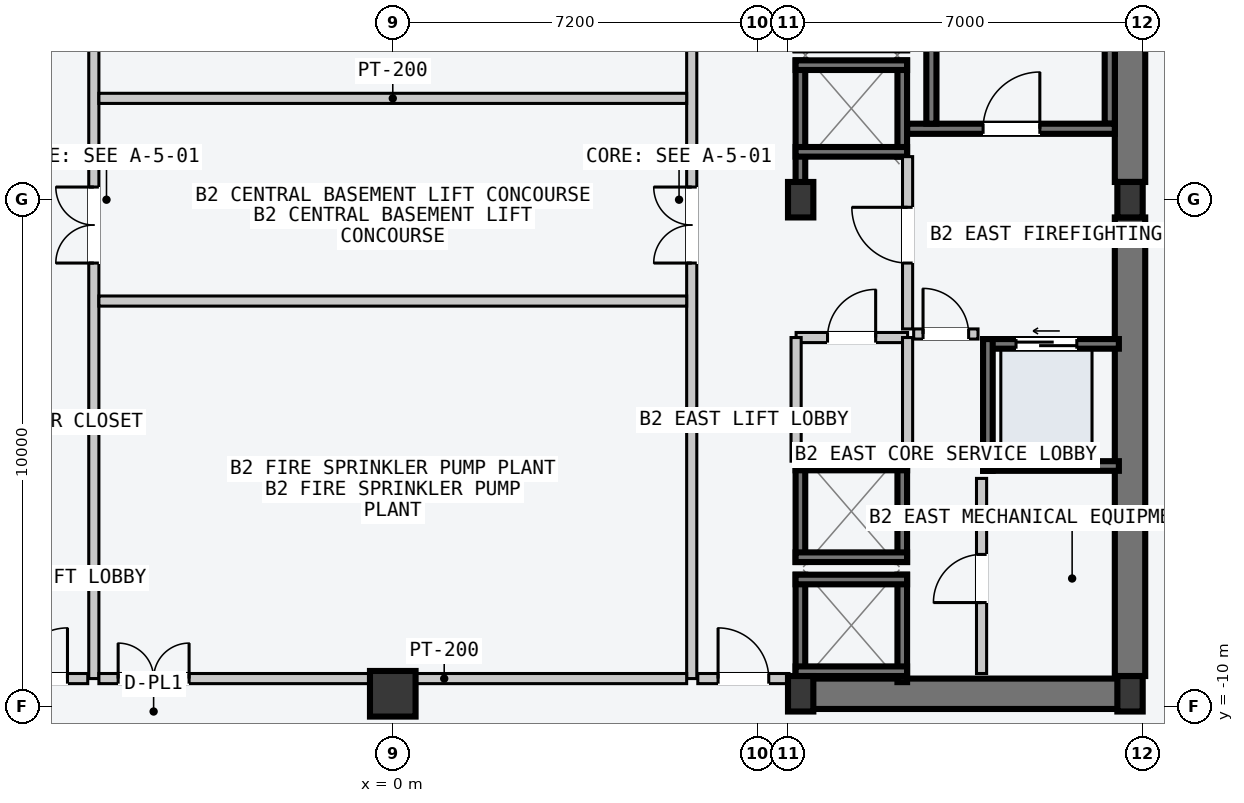
"""IFC4 building model, lengths in metres.
Left out: names, types, materials, properties, quantities, classifications, styles, units other than length and angle.
Written with IfcOpenShell. Run it as: python <this file> out.ifc"""

import sys

from ifc_helpers import new_model, si_unit, direction, frame, frame_2d, origin, origin_2d, place, context, subcontext, project, spatial, rectangle, hollow_rectangle, i_section, extrude, element, fill, save


model = new_model("IFC4")
c1 = context("Model", 3, precision=1e-05, world=origin(), true_north=direction((0.0, 1.0)))
c2 = subcontext(c1, "Body", "Model", "MODEL_VIEW")
j1 = project(units=[si_unit("LENGTHUNIT", "METRE"), si_unit("PLANEANGLEUNIT", "RADIAN")], contexts=[c1])
p1 = place(None, origin())
s1 = spatial("IfcSite", under=j1, at=p1, CompositionType="ELEMENT")
p2 = place(p1, origin())
s2 = spatial("IfcBuilding", under=s1, at=p2, CompositionType="ELEMENT")
p3 = place(p2, frame((0.0, 0.0, -9.6)))
s3 = spatial("IfcBuildingStorey", under=s2, at=p3, CompositionType="ELEMENT", Elevation=-9.6)
p4 = place(p3, frame((8.07, -9.75, 0.0), z_axis=(0.0, 0.0, 1.0), x_axis=(1.0, 0.0, 0.0)))
e1 = element("IfcWall", 1, at=p4, inside=s3, PredefinedType="SHEAR", context=c2, shape_type="SweptSolid", body=[
    extrude(rectangle(XDim=6.46, YDim=0.6, at=frame_2d((3.23, 0.0))), origin(), (0.0, 0.0, 1.0), 4.58),
])
for number, where, z_axis, x_axis in (
    (2, (14.55, -9.4, 0.0), (0.0, 0.0, 1.0), (0.0, 1.0, 0.0)),
    (3, (14.55, 0.35, 0.0), (0.0, 0.0, 1.0), (0.0, 1.0, 0.0)),
):
    element("IfcWall", number, at=place(p3, frame(where, z_axis=z_axis, x_axis=x_axis)), inside=s3, PredefinedType="SHEAR", context=c2, shape_type="SweptSolid", body=[
        extrude(rectangle(XDim=9.05, YDim=0.6, at=frame_2d((4.525, 0.0))), origin(), (0.0, 0.0, 1.0), 4.58),
    ])
p5 = place(p3, frame((14.15, 1.5, 0.0), z_axis=(0.0, 0.0, 1.0), x_axis=(0.0, 1.0, 0.0)))
e4 = element("IfcWall", 4, at=p5, inside=s3, PredefinedType="SOLIDWALL", context=c2, shape_type="SweptSolid", body=[
    extrude(rectangle(XDim=7.8, YDim=0.2, at=frame_2d((3.9, 0.0))), origin(), (0.0, 0.0, 1.0), 4.58),
])
p6 = place(p3, frame((10.15, 1.4, 0.0), z_axis=(0.0, 0.0, 1.0), x_axis=(1.0, 0.0, 0.0)))
e5 = element("IfcWall", 5, at=p6, inside=s3, PredefinedType="SOLIDWALL", context=c2, shape_type="SweptSolid", body=[
    extrude(rectangle(XDim=4.1, YDim=0.2, at=frame_2d((2.05, 0.0))), origin(), (0.0, 0.0, 1.0), 4.58),
])
p7 = place(p6, frame((1.5, 0.0, 0.0)))
e6 = element("IfcOpeningElement", 6, at=p7, cuts=e5, PredefinedType="OPENING", context=c2, shape_type="SweptSolid", body=[
    extrude(rectangle(XDim=1.12, YDim=2.18, at=frame_2d((0.56, 1.09))), frame((0.0, 0.11, 0.0), z_axis=(0.0, -1.0, 0.0), x_axis=(1.0, 0.0, 0.0)), (0.0, 0.0, 1.0), 0.22),
])
p8 = place(p3, frame((10.63, 1.5, 0.0), z_axis=(0.0, 0.0, 1.0), x_axis=(0.0, 1.0, 0.0)))
e7 = element("IfcWall", 7, at=p8, inside=s3, PredefinedType="SOLIDWALL", context=c2, shape_type="SweptSolid", body=[
    extrude(rectangle(XDim=7.8, YDim=0.2, at=frame_2d((3.9, 0.0))), origin(), (0.0, 0.0, 1.0), 4.58),
])
for number, where, z_axis, x_axis in (
    (8, (8.05, -9.75, 0.0), (0.0, 0.0, 1.0), (1.0, 0.0, 0.0)),
    (9, (8.05, 0.0, 0.0), (0.0, 0.0, 1.0), (1.0, 0.0, 0.0)),
    (10, (14.55, -9.75, 0.0), (0.0, 0.0, 1.0), (1.0, 0.0, 0.0)),
    (11, (14.55, 0.0, 0.0), (0.0, 0.0, 1.0), (1.0, 0.0, 0.0)),
):
    element("IfcColumn", number, at=place(p3, frame(where, z_axis=z_axis, x_axis=x_axis)), inside=s3, PredefinedType="COLUMN", context=c2, shape_type="SweptSolid", body=[
        extrude(i_section(OverallWidth=0.5, OverallDepth=0.7, WebThickness=0.028, FlangeThickness=0.045, at=origin_2d()), origin(), (0.0, 0.0, 1.0), 4.8),
    ])
p9 = place(p3, frame((0.0, -9.75, 0.0), z_axis=(0.0, 0.0, 1.0), x_axis=(1.0, 0.0, 0.0)))
e12 = element("IfcColumn", 12, at=p9, inside=s3, PredefinedType="COLUMN", context=c2, shape_type="SweptSolid", body=[
    extrude(hollow_rectangle(XDim=0.9, YDim=0.9, WallThickness=0.045, at=origin_2d()), origin(), (0.0, 0.0, 1.0), 4.8),
])
p10 = place(p3, frame((8.045, 0.21, 0.0), z_axis=(0.0, 0.0, 1.0), x_axis=(0.0, 1.0, 0.0)))
e13 = element("IfcWall", 13, at=p10, inside=s3, PredefinedType="SOLIDWALL", context=c2, shape_type="SweptSolid", body=[
    extrude(rectangle(XDim=2.54, YDim=0.19, at=frame_2d((1.27, 0.0))), origin(), (0.0, 0.0, 1.0), 4.58),
])
p11 = place(p3, frame((10.055, 0.85, 0.0), z_axis=(0.0, 0.0, 1.0), x_axis=(0.0, 1.0, 0.0)))
e14 = element("IfcWall", 14, at=p11, inside=s3, PredefinedType="SOLIDWALL", context=c2, shape_type="SweptSolid", body=[
    extrude(rectangle(XDim=1.9, YDim=0.19, at=frame_2d((0.95, 0.0))), origin(), (0.0, 0.0, 1.0), 4.58),
])
for number, where, z_axis, x_axis in (
    (15, (7.95, 2.655, 0.0), (0.0, 0.0, 1.0), (1.0, 0.0, 0.0)),
    (16, (7.95, 0.945, 0.0), (0.0, 0.0, 1.0), (1.0, 0.0, 0.0)),
):
    element("IfcWall", number, at=place(p3, frame(where, z_axis=z_axis, x_axis=x_axis)), inside=s3, PredefinedType="SOLIDWALL", context=c2, shape_type="SweptSolid", body=[
        extrude(rectangle(XDim=2.2, YDim=0.19, at=frame_2d((1.1, 0.0))), origin(), (0.0, 0.0, 1.0), 4.58),
    ])
for number, where, z_axis, x_axis in (
    (17, (8.045, -9.52, 0.0), (0.0, 0.0, 1.0), (0.0, 1.0, 0.0)),
    (18, (10.055, -9.52, 0.0), (0.0, 0.0, 1.0), (0.0, 1.0, 0.0)),
):
    element("IfcWall", number, at=place(p3, frame(where, z_axis=z_axis, x_axis=x_axis)), inside=s3, PredefinedType="SOLIDWALL", context=c2, shape_type="SweptSolid", body=[
        extrude(rectangle(XDim=2.12, YDim=0.19, at=frame_2d((1.06, 0.0))), origin(), (0.0, 0.0, 1.0), 4.58),
    ])
for number, where, z_axis, x_axis in (
    (19, (7.95, -7.495, 0.0), (0.0, 0.0, 1.0), (1.0, 0.0, 0.0)),
    (20, (7.95, -9.305, 0.0), (0.0, 0.0, 1.0), (1.0, 0.0, 0.0)),
):
    element("IfcWall", number, at=place(p3, frame(where, z_axis=z_axis, x_axis=x_axis)), inside=s3, PredefinedType="SOLIDWALL", context=c2, shape_type="SweptSolid", body=[
        extrude(rectangle(XDim=2.2, YDim=0.19, at=frame_2d((1.1, 0.0))), origin(), (0.0, 0.0, 1.0), 4.58),
    ])
for number, where, z_axis, x_axis in (
    (21, (8.045, -7.15, 0.0), (0.0, 0.0, 1.0), (0.0, 1.0, 0.0)),
    (22, (10.055, -7.15, 0.0), (0.0, 0.0, 1.0), (0.0, 1.0, 0.0)),
):
    element("IfcWall", number, at=place(p3, frame(where, z_axis=z_axis, x_axis=x_axis)), inside=s3, PredefinedType="SOLIDWALL", context=c2, shape_type="SweptSolid", body=[
        extrude(rectangle(XDim=2.0, YDim=0.19, at=frame_2d((1.0, 0.0))), origin(), (0.0, 0.0, 1.0), 4.58),
    ])
for number, where, z_axis, x_axis in (
    (23, (7.95, -5.245, 0.0), (0.0, 0.0, 1.0), (1.0, 0.0, 0.0)),
    (24, (7.95, -7.055, 0.0), (0.0, 0.0, 1.0), (1.0, 0.0, 0.0)),
):
    element("IfcWall", number, at=place(p3, frame(where, z_axis=z_axis, x_axis=x_axis)), inside=s3, PredefinedType="SOLIDWALL", context=c2, shape_type="SweptSolid", body=[
        extrude(rectangle(XDim=2.2, YDim=0.19, at=frame_2d((1.1, 0.0))), origin(), (0.0, 0.0, 1.0), 4.58),
    ])
p12 = place(p3, frame((11.65, -2.845, 0.0), z_axis=(0.0, 0.0, 1.0), x_axis=(1.0, 0.0, 0.0)))
e25 = element("IfcWall", 25, at=p12, inside=s3, PredefinedType="SOLIDWALL", context=c2, shape_type="SweptSolid", body=[
    extrude(rectangle(XDim=2.68, YDim=0.19, at=frame_2d((1.34, 0.0))), origin(), (0.0, 0.0, 1.0), 4.58),
])
p13 = place(p12, frame((0.65, 0.0, 0.0)))
e26 = element("IfcOpeningElement", 26, at=p13, cuts=e25, PredefinedType="OPENING", context=c2, shape_type="SweptSolid", body=[
    extrude(rectangle(XDim=1.2, YDim=2.2, at=frame_2d((0.6, 1.1))), frame((0.0, 0.105, 0.0), z_axis=(0.0, -1.0, 0.0), x_axis=(1.0, 0.0, 0.0)), (0.0, 0.0, 1.0), 0.21),
])
p14 = place(p3, frame((11.65, -5.255, 0.0), z_axis=(0.0, 0.0, 1.0), x_axis=(1.0, 0.0, 0.0)))
e27 = element("IfcWall", 27, at=p14, inside=s3, PredefinedType="SOLIDWALL", context=c2, shape_type="SweptSolid", body=[
    extrude(rectangle(XDim=2.68, YDim=0.19, at=frame_2d((1.34, 0.0))), origin(), (0.0, 0.0, 1.0), 4.58),
])
p15 = place(p3, frame((11.745, -5.35, 0.0), z_axis=(0.0, 0.0, 1.0), x_axis=(0.0, 1.0, 0.0)))
e28 = element("IfcWall", 28, at=p15, inside=s3, PredefinedType="SOLIDWALL", context=c2, shape_type="SweptSolid", body=[
    extrude(rectangle(XDim=2.6, YDim=0.19, at=frame_2d((1.3, 0.0))), origin(), (0.0, 0.0, 1.0), 4.58),
])
p16 = place(p3, frame((-5.9, -9.45, 0.0), z_axis=(0.0, 0.0, 1.0), x_axis=(0.0, 1.0, 0.0)))
e29 = element("IfcWall", 29, at=p16, inside=s3, PredefinedType="PARTITIONING", context=c2, shape_type="SweptSolid", body=[
    extrude(rectangle(XDim=18.9, YDim=0.2, at=frame_2d((9.45, 0.0))), origin(), (0.0, 0.0, 1.0), 4.58),
])
p17 = place(p16, frame((8.2, 0.0, 0.0)))
e30 = element("IfcOpeningElement", 30, at=p17, cuts=e29, PredefinedType="OPENING", context=c2, shape_type="SweptSolid", body=[
    extrude(rectangle(XDim=1.5, YDim=2.2, at=frame_2d((0.75, 1.1))), frame((0.0, 0.11, 0.0), z_axis=(0.0, -1.0, 0.0), x_axis=(1.0, 0.0, 0.0)), (0.0, 0.0, 1.0), 0.22),
])
p18 = place(p3, frame((5.9, -9.45, 0.0), z_axis=(0.0, 0.0, 1.0), x_axis=(0.0, 1.0, 0.0)))
e31 = element("IfcWall", 31, at=p18, inside=s3, PredefinedType="PARTITIONING", context=c2, shape_type="SweptSolid", body=[
    extrude(rectangle(XDim=18.9, YDim=0.2, at=frame_2d((9.45, 0.0))), origin(), (0.0, 0.0, 1.0), 4.58),
])
p19 = place(p18, frame((8.2, 0.0, 0.0)))
e32 = element("IfcOpeningElement", 32, at=p19, cuts=e31, PredefinedType="OPENING", context=c2, shape_type="SweptSolid", body=[
    extrude(rectangle(XDim=1.5, YDim=2.2, at=frame_2d((0.75, 1.1))), frame((0.0, 0.11, 0.0), z_axis=(0.0, -1.0, 0.0), x_axis=(1.0, 0.0, 0.0)), (0.0, 0.0, 1.0), 0.22),
])
p20 = place(p3, frame((10.16, -2.55, 0.0), z_axis=(0.0, 0.0, 1.0), x_axis=(0.0, 1.0, 0.0)))
e33 = element("IfcWall", 33, at=p20, inside=s3, PredefinedType="PARTITIONING", context=c2, shape_type="SweptSolid", body=[
    extrude(rectangle(XDim=3.4, YDim=0.2, at=frame_2d((1.7, 0.0))), origin(), (0.0, 0.0, 1.0), 4.58),
])
p21 = place(p20, frame((1.3, 0.0, 0.0)))
e34 = element("IfcOpeningElement", 34, at=p21, cuts=e33, PredefinedType="OPENING", context=c2, shape_type="SweptSolid", body=[
    extrude(rectangle(XDim=1.1, YDim=2.15, at=frame_2d((0.55, 1.075))), frame((0.0, 0.11, 0.0), z_axis=(0.0, -1.0, 0.0), x_axis=(1.0, 0.0, 0.0)), (0.0, 0.0, 1.0), 0.22),
])
p22 = place(p3, frame((10.28, -2.65, 0.0), z_axis=(0.0, 0.0, 1.0), x_axis=(1.0, 0.0, 0.0)))
e35 = element("IfcWall", 35, at=p22, inside=s3, PredefinedType="PARTITIONING", context=c2, shape_type="SweptSolid", body=[
    extrude(rectangle(XDim=1.27, YDim=0.2, at=frame_2d((0.635, 0.0))), origin(), (0.0, 0.0, 1.0), 4.58),
])
p23 = place(p22, frame((0.185, 0.0, 0.0)))
e36 = element("IfcOpeningElement", 36, at=p23, cuts=e35, PredefinedType="OPENING", context=c2, shape_type="SweptSolid", body=[
    extrude(rectangle(XDim=0.9, YDim=2.15, at=frame_2d((0.45, 1.075))), frame((0.0, 0.11, 0.0), z_axis=(0.0, -1.0, 0.0), x_axis=(1.0, 0.0, 0.0)), (0.0, 0.0, 1.0), 0.22),
])
p24 = place(p3, frame((7.96, -2.72, 0.0), z_axis=(0.0, 0.0, 1.0), x_axis=(1.0, 0.0, 0.0)))
e37 = element("IfcWall", 37, at=p24, inside=s3, PredefinedType="PARTITIONING", context=c2, shape_type="SweptSolid", body=[
    extrude(rectangle(XDim=2.2, YDim=0.2, at=frame_2d((1.1, 0.0))), origin(), (0.0, 0.0, 1.0), 4.58),
])
p25 = place(p24, frame((0.62, 0.0, 0.0)))
e38 = element("IfcOpeningElement", 38, at=p25, cuts=e37, PredefinedType="OPENING", context=c2, shape_type="SweptSolid", body=[
    extrude(rectangle(XDim=0.95, YDim=2.1, at=frame_2d((0.475, 1.05))), frame((0.0, 0.11, 0.0), z_axis=(0.0, -1.0, 0.0), x_axis=(1.0, 0.0, 0.0)), (0.0, 0.0, 1.0), 0.22),
])
for number, where, z_axis, x_axis in (
    (39, (7.96, -5.16, 0.0), (0.0, 0.0, 1.0), (0.0, 1.0, 0.0)),
    (40, (10.16, -5.16, 0.0), (0.0, 0.0, 1.0), (0.0, 1.0, 0.0)),
):
    element("IfcWall", number, at=place(p3, frame(where, z_axis=z_axis, x_axis=x_axis)), inside=s3, PredefinedType="PARTITIONING", context=c2, shape_type="SweptSolid", body=[
        extrude(rectangle(XDim=2.44, YDim=0.2, at=frame_2d((1.22, 0.0))), origin(), (0.0, 0.0, 1.0), 4.58),
    ])
p26 = place(p3, frame((11.62, -9.35, 0.0), z_axis=(0.0, 0.0, 1.0), x_axis=(0.0, 1.0, 0.0)))
e41 = element("IfcWall", 41, at=p26, inside=s3, PredefinedType="PARTITIONING", context=c2, shape_type="SweptSolid", body=[
    extrude(rectangle(XDim=3.85, YDim=0.2, at=frame_2d((1.925, 0.0))), origin(), (0.0, 0.0, 1.0), 4.58),
])
p27 = place(p26, frame((1.4, 0.0, 0.0)))
e42 = element("IfcOpeningElement", 42, at=p27, cuts=e41, PredefinedType="OPENING", context=c2, shape_type="SweptSolid", body=[
    extrude(rectangle(XDim=0.95, YDim=2.1, at=frame_2d((0.475, 1.05))), frame((0.0, 0.11, 0.0), z_axis=(0.0, -1.0, 0.0), x_axis=(1.0, 0.0, 0.0)), (0.0, 0.0, 1.0), 0.22),
])
p28 = place(p3, frame((-7.82, -9.45, 0.0), z_axis=(0.0, 0.0, 1.0), x_axis=(1.0, 0.0, 0.0)))
e43 = element("IfcWall", 43, at=p28, inside=s3, PredefinedType="PARTITIONING", context=c2, shape_type="SweptSolid", body=[
    extrude(rectangle(XDim=1.8, YDim=0.2, at=frame_2d((0.9, 0.0))), origin(), (0.0, 0.0, 1.0), 4.58),
])
p29 = place(p28, frame((0.4, 0.0, 0.0)))
e44 = element("IfcOpeningElement", 44, at=p29, cuts=e43, PredefinedType="OPENING", context=c2, shape_type="SweptSolid", body=[
    extrude(rectangle(XDim=1.0, YDim=2.15, at=frame_2d((0.5, 1.075))), frame((0.0, 0.11, 0.0), z_axis=(0.0, -1.0, 0.0), x_axis=(1.0, 0.0, 0.0)), (0.0, 0.0, 1.0), 0.22),
])
p30 = place(p3, frame((6.02, -9.45, 0.0), z_axis=(0.0, 0.0, 1.0), x_axis=(1.0, 0.0, 0.0)))
e45 = element("IfcWall", 45, at=p30, inside=s3, PredefinedType="PARTITIONING", context=c2, shape_type="SweptSolid", body=[
    extrude(rectangle(XDim=1.8, YDim=0.2, at=frame_2d((0.9, 0.0))), origin(), (0.0, 0.0, 1.0), 4.58),
])
p31 = place(p30, frame((0.4, 0.0, 0.0)))
e46 = element("IfcOpeningElement", 46, at=p31, cuts=e45, PredefinedType="OPENING", context=c2, shape_type="SweptSolid", body=[
    extrude(rectangle(XDim=1.0, YDim=2.15, at=frame_2d((0.5, 1.075))), frame((0.0, 0.11, 0.0), z_axis=(0.0, -1.0, 0.0), x_axis=(1.0, 0.0, 0.0)), (0.0, 0.0, 1.0), 0.22),
])
p32 = place(p3, frame((-5.8, -9.45, 0.0), z_axis=(0.0, 0.0, 1.0), x_axis=(1.0, 0.0, 0.0)))
e47 = element("IfcWall", 47, at=p32, inside=s3, PredefinedType="PARTITIONING", context=c2, shape_type="SweptSolid", body=[
    extrude(rectangle(XDim=11.6, YDim=0.2, at=frame_2d((5.8, 0.0))), origin(), (0.0, 0.0, 1.0), 4.58),
])
p33 = place(p32, frame((0.38, 0.0, 0.0)))
e48 = element("IfcOpeningElement", 48, at=p33, cuts=e47, PredefinedType="OPENING", context=c2, shape_type="SweptSolid", body=[
    extrude(rectangle(XDim=1.4, YDim=2.25, at=frame_2d((0.7, 1.125))), frame((0.0, 0.11, 0.0), z_axis=(0.0, -1.0, 0.0), x_axis=(1.0, 0.0, 0.0)), (0.0, 0.0, 1.0), 0.22),
])
for number, where, z_axis, x_axis in (
    (49, (-5.8, -2.0, 0.0), (0.0, 0.0, 1.0), (1.0, 0.0, 0.0)),
    (50, (-5.8, 2.0, 0.0), (0.0, 0.0, 1.0), (1.0, 0.0, 0.0)),
):
    element("IfcWall", number, at=place(p3, frame(where, z_axis=z_axis, x_axis=x_axis)), inside=s3, PredefinedType="PARTITIONING", context=c2, shape_type="SweptSolid", body=[
        extrude(rectangle(XDim=11.6, YDim=0.2, at=frame_2d((5.8, 0.0))), origin(), (0.0, 0.0, 1.0), 4.58),
    ])
p34 = place(p7, origin())
e51 = element("IfcDoor", 51, at=p34, inside=s3, OperationType="SINGLE_SWING_RIGHT", PredefinedType="DOOR", context=c2, shape_type="SweptSolid", body=[
    extrude(rectangle(XDim=1.12, YDim=2.18, at=frame_2d((0.56, 1.09))), frame((0.0, 0.025, 0.0), z_axis=(0.0, -1.0, 0.0), x_axis=(1.0, 0.0, 0.0)), (0.0, 0.0, 1.0), 0.05),
])
fill(e6, e51)
p35 = place(p13, origin())
e52 = element("IfcDoor", 52, at=p35, inside=s3, OperationType="SLIDING_TO_LEFT", PredefinedType="DOOR", context=c2, shape_type="SweptSolid", body=[
    extrude(rectangle(XDim=1.2, YDim=2.2, at=frame_2d((0.6, 1.1))), frame((0.0, 0.025, 0.0), z_axis=(0.0, -1.0, 0.0), x_axis=(1.0, 0.0, 0.0)), (0.0, 0.0, 1.0), 0.05),
])
fill(e26, e52)
p36 = place(p17, origin())
e53 = element("IfcDoor", 53, at=p36, inside=s3, OperationType="DOUBLE_DOOR_SINGLE_SWING", PredefinedType="DOOR", context=c2, shape_type="SweptSolid", body=[
    extrude(rectangle(XDim=1.5, YDim=2.2, at=frame_2d((0.75, 1.1))), frame((0.0, 0.025, 0.0), z_axis=(0.0, -1.0, 0.0), x_axis=(1.0, 0.0, 0.0)), (0.0, 0.0, 1.0), 0.05),
])
fill(e30, e53)
p37 = place(p19, origin())
e54 = element("IfcDoor", 54, at=p37, inside=s3, OperationType="DOUBLE_DOOR_SINGLE_SWING", PredefinedType="DOOR", context=c2, shape_type="SweptSolid", body=[
    extrude(rectangle(XDim=1.5, YDim=2.2, at=frame_2d((0.75, 1.1))), frame((0.0, 0.025, 0.0), z_axis=(0.0, -1.0, 0.0), x_axis=(1.0, 0.0, 0.0)), (0.0, 0.0, 1.0), 0.05),
])
fill(e32, e54)
p38 = place(p21, origin())
e55 = element("IfcDoor", 55, at=p38, inside=s3, OperationType="SINGLE_SWING_RIGHT", PredefinedType="DOOR", context=c2, shape_type="SweptSolid", body=[
    extrude(rectangle(XDim=1.1, YDim=2.15, at=frame_2d((0.55, 1.075))), frame((0.0, 0.025, 0.0), z_axis=(0.0, -1.0, 0.0), x_axis=(1.0, 0.0, 0.0)), (0.0, 0.0, 1.0), 0.05),
])
fill(e34, e55)
p39 = place(p23, origin())
e56 = element("IfcDoor", 56, at=p39, inside=s3, OperationType="SINGLE_SWING_LEFT", PredefinedType="DOOR", context=c2, shape_type="SweptSolid", body=[
    extrude(rectangle(XDim=0.9, YDim=2.15, at=frame_2d((0.45, 1.075))), frame((0.0, 0.025, 0.0), z_axis=(0.0, -1.0, 0.0), x_axis=(1.0, 0.0, 0.0)), (0.0, 0.0, 1.0), 0.05),
])
fill(e36, e56)
p40 = place(p25, origin())
e57 = element("IfcDoor", 57, at=p40, inside=s3, OperationType="SINGLE_SWING_RIGHT", PredefinedType="DOOR", context=c2, shape_type="SweptSolid", body=[
    extrude(rectangle(XDim=0.95, YDim=2.1, at=frame_2d((0.475, 1.05))), frame((0.0, 0.025, 0.0), z_axis=(0.0, -1.0, 0.0), x_axis=(1.0, 0.0, 0.0)), (0.0, 0.0, 1.0), 0.05),
])
fill(e38, e57)
p41 = place(p27, origin())
e58 = element("IfcDoor", 58, at=p41, inside=s3, OperationType="SINGLE_SWING_LEFT", PredefinedType="DOOR", context=c2, shape_type="SweptSolid", body=[
    extrude(rectangle(XDim=0.95, YDim=2.1, at=frame_2d((0.475, 1.05))), frame((0.0, 0.025, 0.0), z_axis=(0.0, -1.0, 0.0), x_axis=(1.0, 0.0, 0.0)), (0.0, 0.0, 1.0), 0.05),
])
fill(e42, e58)
p42 = place(p29, origin())
e59 = element("IfcDoor", 59, at=p42, inside=s3, OperationType="SINGLE_SWING_RIGHT", PredefinedType="DOOR", context=c2, shape_type="SweptSolid", body=[
    extrude(rectangle(XDim=1.0, YDim=2.15, at=frame_2d((0.5, 1.075))), frame((0.0, 0.025, 0.0), z_axis=(0.0, -1.0, 0.0), x_axis=(1.0, 0.0, 0.0)), (0.0, 0.0, 1.0), 0.05),
])
fill(e44, e59)
p43 = place(p31, origin())
e60 = element("IfcDoor", 60, at=p43, inside=s3, OperationType="SINGLE_SWING_LEFT", PredefinedType="DOOR", context=c2, shape_type="SweptSolid", body=[
    extrude(rectangle(XDim=1.0, YDim=2.15, at=frame_2d((0.5, 1.075))), frame((0.0, 0.025, 0.0), z_axis=(0.0, -1.0, 0.0), x_axis=(1.0, 0.0, 0.0)), (0.0, 0.0, 1.0), 0.05),
])
fill(e46, e60)
p44 = place(p33, origin())
e61 = element("IfcDoor", 61, at=p44, inside=s3, OperationType="DOUBLE_DOOR_SINGLE_SWING", PredefinedType="DOOR", context=c2, shape_type="SweptSolid", body=[
    extrude(rectangle(XDim=1.4, YDim=2.25, at=frame_2d((0.7, 1.125))), frame((0.0, 0.025, 0.0), z_axis=(0.0, -1.0, 0.0), x_axis=(1.0, 0.0, 0.0)), (0.0, 0.0, 1.0), 0.05),
])
fill(e48, e61)
save(model, sys.argv[1])
